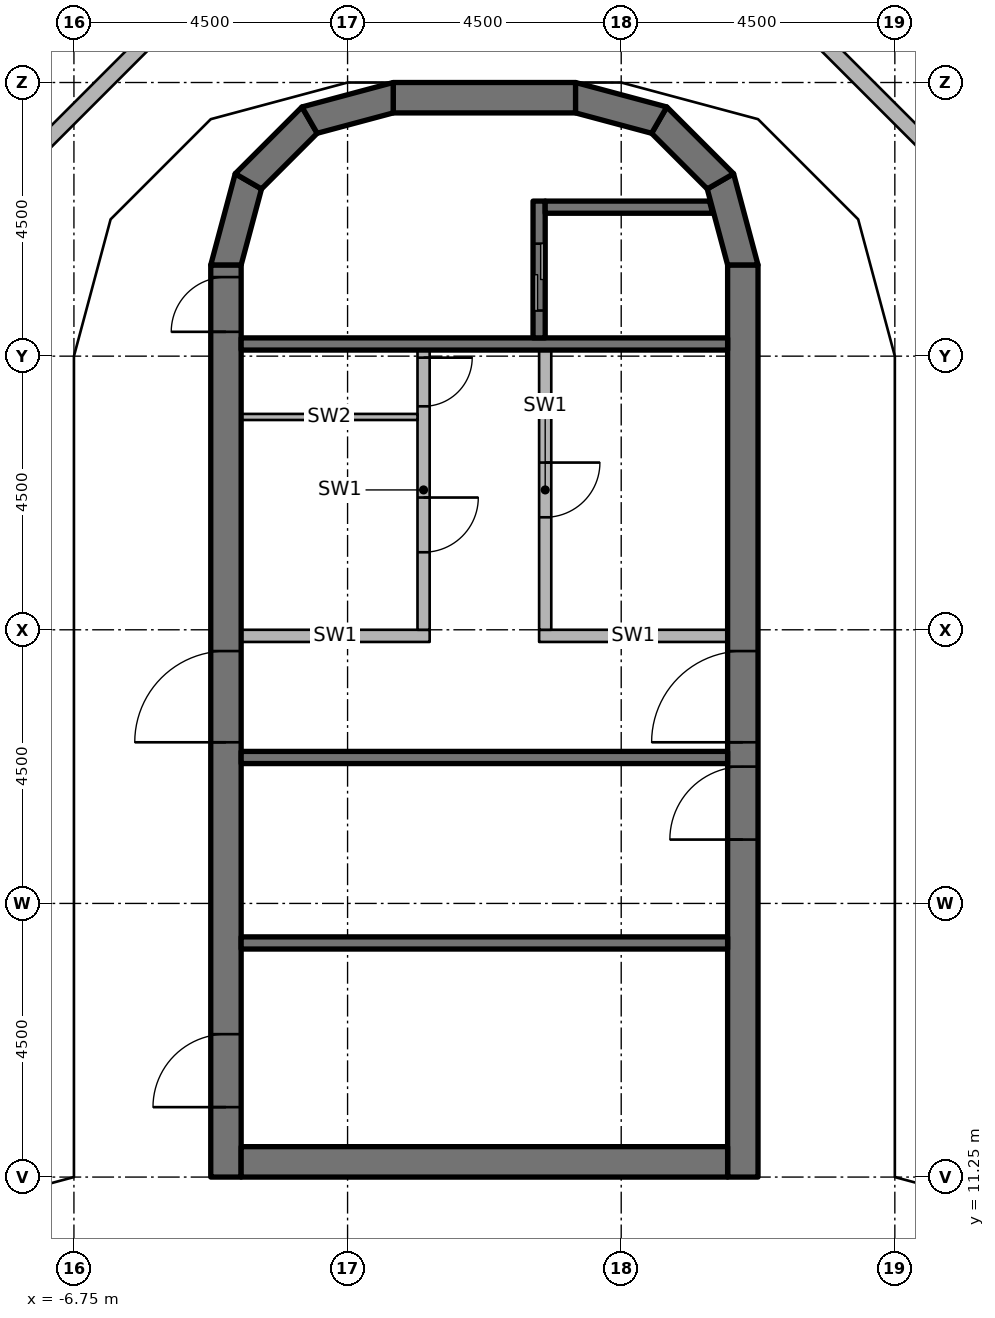
"""IFC4 building model, lengths in metres.
Left out: names, types, materials, properties, quantities, classifications, styles, units other than length and angle.
Written with IfcOpenShell. Run it as: python <this file> out.ifc"""

import sys

from ifc_helpers import new_model, si_unit, direction, frame, frame_2d, origin, origin_2d, place, context, subcontext, project, spatial, polyline, rectangle, outline, extrude, element, fill, save


model = new_model("IFC4")
c1 = context("Model", 3, precision=1e-05, world=origin(), true_north=direction((0.0, 1.0)))
c2 = subcontext(c1, "Body", "Model", "MODEL_VIEW")
j1 = project(units=[si_unit("LENGTHUNIT", "METRE"), si_unit("PLANEANGLEUNIT", "RADIAN")], contexts=[c1])
p1 = place(None, origin())
s1 = spatial("IfcSite", under=j1, at=p1, CompositionType="ELEMENT")
p2 = place(p1, origin())
s2 = spatial("IfcBuilding", under=s1, at=p2, CompositionType="ELEMENT")
p3 = place(p2, frame((0.0, 0.0, 295.2)))
s3 = spatial("IfcBuildingStorey", under=s2, at=p3, CompositionType="ELEMENT", Elevation=295.2)
for number, where, z_axis, x_axis in (
    (1, (-6.25, 10.75, 0.0), (0.0, 0.0, 1.0), (1.0, 0.0, 0.0)),
    (2, (-6.25, 15.75, 0.0), (0.0, 0.0, 1.0), (1.0, 0.0, 0.0)),
    (3, (-6.25, 20.25, 0.0), (0.0, 0.0, 1.0), (1.0, 0.0, 0.0)),
    (4, (-6.25, 24.65, 0.0), (0.0, 0.0, 1.0), (1.0, 0.0, 0.0)),
    (5, (6.25, 10.75, 0.0), (0.0, 0.0, 1.0), (1.0, 0.0, 0.0)),
    (6, (6.25, 15.75, 0.0), (0.0, 0.0, 1.0), (1.0, 0.0, 0.0)),
    (7, (6.25, 20.25, 0.0), (0.0, 0.0, 1.0), (1.0, 0.0, 0.0)),
    (8, (6.25, 24.65, 0.0), (0.0, 0.0, 1.0), (1.0, 0.0, 0.0)),
):
    element("IfcColumn", number, at=place(p3, frame(where, z_axis=z_axis, x_axis=x_axis)), inside=s3, PredefinedType="COLUMN", context=c2, shape_type="SweptSolid", body=[
        extrude(rectangle(XDim=0.6, YDim=0.6, at=origin_2d()), origin(), (0.0, 0.0, 1.0), 3.45),
    ])
p4 = place(p3, frame((-4.25, 11.25, 0.0), z_axis=(0.0, 0.0, 1.0), x_axis=(0.0, 1.0, 0.0)))
e9 = element("IfcWall", 9, at=p4, inside=s3, PredefinedType="SHEAR", context=c2, shape_type="SweptSolid", body=[
    extrude(rectangle(XDim=15.0, YDim=0.5, at=frame_2d((7.5, 0.0))), origin(), (0.0, 0.0, 1.0), 3.6),
])
p5 = place(p4, frame((7.15, 0.0, 0.0)))
e10 = element("IfcOpeningElement", 10, at=p5, cuts=e9, PredefinedType="OPENING", context=c2, shape_type="SweptSolid", body=[
    extrude(rectangle(XDim=1.5, YDim=2.3, at=frame_2d((0.75, 1.15))), frame((0.0, 0.26, 0.0), z_axis=(0.0, -1.0, 0.0), x_axis=(1.0, 0.0, 0.0)), (0.0, 0.0, 1.0), 0.52),
])
p6 = place(p4, frame((13.9, 0.0, 0.0)))
e11 = element("IfcOpeningElement", 11, at=p6, cuts=e9, PredefinedType="OPENING", context=c2, shape_type="SweptSolid", body=[
    extrude(rectangle(XDim=0.9, YDim=2.1, at=frame_2d((0.45, 1.05))), frame((0.0, 0.26, 0.0), z_axis=(0.0, -1.0, 0.0), x_axis=(1.0, 0.0, 0.0)), (0.0, 0.0, 1.0), 0.52),
])
p7 = place(p4, frame((1.15, 0.0, 0.0)))
e12 = element("IfcOpeningElement", 12, at=p7, cuts=e9, PredefinedType="OPENING", context=c2, shape_type="SweptSolid", body=[
    extrude(rectangle(XDim=1.2, YDim=2.1, at=frame_2d((0.6, 1.05))), frame((0.0, 0.26, 0.0), z_axis=(0.0, -1.0, 0.0), x_axis=(1.0, 0.0, 0.0)), (0.0, 0.0, 1.0), 0.52),
])
p8 = place(p3, frame((4.25, 11.25, 0.0), z_axis=(0.0, 0.0, 1.0), x_axis=(0.0, 1.0, 0.0)))
e13 = element("IfcWall", 13, at=p8, inside=s3, PredefinedType="SHEAR", context=c2, shape_type="SweptSolid", body=[
    extrude(rectangle(XDim=15.0, YDim=0.5, at=frame_2d((7.5, 0.0))), origin(), (0.0, 0.0, 1.0), 3.6),
])
p9 = place(p8, frame((7.15, 0.0, 0.0)))
e14 = element("IfcOpeningElement", 14, at=p9, cuts=e13, PredefinedType="OPENING", context=c2, shape_type="SweptSolid", body=[
    extrude(rectangle(XDim=1.5, YDim=2.3, at=frame_2d((0.75, 1.15))), frame((0.0, 0.26, 0.0), z_axis=(0.0, -1.0, 0.0), x_axis=(1.0, 0.0, 0.0)), (0.0, 0.0, 1.0), 0.52),
])
p10 = place(p8, frame((5.55, 0.0, 0.0)))
e15 = element("IfcOpeningElement", 15, at=p10, cuts=e13, PredefinedType="OPENING", context=c2, shape_type="SweptSolid", body=[
    extrude(rectangle(XDim=1.2, YDim=2.1, at=frame_2d((0.6, 1.05))), frame((0.0, 0.26, 0.0), z_axis=(0.0, -1.0, 0.0), x_axis=(1.0, 0.0, 0.0)), (0.0, 0.0, 1.0), 0.52),
])
p11 = place(p3, frame((-4.0, 11.5, 0.0), z_axis=(0.0, 0.0, 1.0), x_axis=(1.0, 0.0, 0.0)))
e16 = element("IfcWall", 16, at=p11, inside=s3, PredefinedType="SHEAR", context=c2, shape_type="SweptSolid", body=[
    extrude(rectangle(XDim=8.0, YDim=0.5, at=frame_2d((4.0, 0.0))), origin(), (0.0, 0.0, 1.0), 3.6),
])
p12 = place(p3, frame((-1.5, 29.0, 0.0), z_axis=(0.0, 0.0, 1.0), x_axis=(1.0, 0.0, 0.0)))
e17 = element("IfcWall", 17, at=p12, inside=s3, PredefinedType="SHEAR", context=c2, shape_type="SweptSolid", body=[
    extrude(rectangle(XDim=3.0, YDim=0.5, at=frame_2d((1.5, 0.0))), origin(), (0.0, 0.0, 1.0), 3.6),
])
p13 = place(p3, origin())
e18 = element("IfcWall", 18, at=p13, inside=s3, PredefinedType="SHEAR", context=c2, shape_type="SweptSolid", body=[
    extrude(outline(polyline([(-4.5, 26.25), (-4.098, 27.75), (-3.665, 27.5), (-4.0, 26.25), (-4.5, 26.25)])), origin(), (0.0, 0.0, 1.0), 3.6),
])
p14 = place(p3, origin())
e19 = element("IfcWall", 19, at=p14, inside=s3, PredefinedType="SHEAR", context=c2, shape_type="SweptSolid", body=[
    extrude(outline(polyline([(-4.098, 27.75), (-3.0, 28.848), (-2.75, 28.415), (-3.665, 27.5), (-4.098, 27.75)])), origin(), (0.0, 0.0, 1.0), 3.6),
])
p15 = place(p3, origin())
e20 = element("IfcWall", 20, at=p15, inside=s3, PredefinedType="SHEAR", context=c2, shape_type="SweptSolid", body=[
    extrude(outline(polyline([(-3.0, 28.848), (-1.5, 29.25), (-1.5, 28.75), (-2.75, 28.415), (-3.0, 28.848)])), origin(), (0.0, 0.0, 1.0), 3.6),
])
p16 = place(p3, origin())
e21 = element("IfcWall", 21, at=p16, inside=s3, PredefinedType="SHEAR", context=c2, shape_type="SweptSolid", body=[
    extrude(outline(polyline([(4.5, 26.25), (4.098, 27.75), (3.665, 27.5), (4.0, 26.25), (4.5, 26.25)])), origin(), (0.0, 0.0, 1.0), 3.6),
])
p17 = place(p3, origin())
e22 = element("IfcWall", 22, at=p17, inside=s3, PredefinedType="SHEAR", context=c2, shape_type="SweptSolid", body=[
    extrude(outline(polyline([(4.098, 27.75), (3.0, 28.848), (2.75, 28.415), (3.665, 27.5), (4.098, 27.75)])), origin(), (0.0, 0.0, 1.0), 3.6),
])
p18 = place(p3, origin())
e23 = element("IfcWall", 23, at=p18, inside=s3, PredefinedType="SHEAR", context=c2, shape_type="SweptSolid", body=[
    extrude(outline(polyline([(3.0, 28.848), (1.5, 29.25), (1.5, 28.75), (2.75, 28.415), (3.0, 28.848)])), origin(), (0.0, 0.0, 1.0), 3.6),
])
p19 = place(p3, origin())
e24 = element("IfcWall", 24, at=p19, inside=s3, PredefinedType="PARAPET", context=c2, shape_type="SweptSolid", body=[
    extrude(outline(polyline([(-7.743, 27.921), (-5.421, 30.243), (-5.292, 30.019), (-7.519, 27.792), (-7.743, 27.921)])), origin(), (0.0, 0.0, 1.0), 1.22),
])
p20 = place(p3, origin())
e25 = element("IfcWall", 25, at=p20, inside=s3, PredefinedType="PARAPET", context=c2, shape_type="SweptSolid", body=[
    extrude(outline(polyline([(5.421, 30.243), (7.743, 27.921), (7.519, 27.792), (5.292, 30.019), (5.421, 30.243)])), origin(), (0.0, 0.0, 1.0), 1.22),
])
p21 = place(p3, frame((-4.0, 24.95, 0.0), z_axis=(0.0, 0.0, 1.0), x_axis=(1.0, 0.0, 0.0)))
e26 = element("IfcWall", 26, at=p21, inside=s3, PredefinedType="SHEAR", context=c2, shape_type="SweptSolid", body=[
    extrude(rectangle(XDim=8.0, YDim=0.2, at=frame_2d((4.0, 0.0))), origin(), (0.0, 0.0, 1.0), 3.45),
])
p22 = place(p3, frame((0.9, 27.3, 0.0), z_axis=(0.0, 0.0, 1.0), x_axis=(0.0, -1.0, 0.0)))
e27 = element("IfcWall", 27, at=p22, inside=s3, PredefinedType="SHEAR", context=c2, shape_type="SweptSolid", body=[
    extrude(rectangle(XDim=2.25, YDim=0.2, at=frame_2d((1.125, 0.0))), origin(), (0.0, 0.0, 1.0), 3.45),
])
p23 = place(p22, frame((0.7, 0.0, 0.0)))
e28 = element("IfcOpeningElement", 28, at=p23, cuts=e27, PredefinedType="OPENING", context=c2, shape_type="SweptSolid", body=[
    extrude(rectangle(XDim=1.1, YDim=2.3, at=frame_2d((0.55, 1.15))), frame((0.0, 0.11, 0.0), z_axis=(0.0, -1.0, 0.0), x_axis=(1.0, 0.0, 0.0)), (0.0, 0.0, 1.0), 0.22),
])
p24 = place(p3, origin())
e29 = element("IfcWall", 29, at=p24, inside=s3, PredefinedType="SHEAR", context=c2, shape_type="SweptSolid", body=[
    extrude(outline(polyline([(1.0, 27.1), (3.755, 27.1), (3.701, 27.3), (1.0, 27.3), (1.0, 27.1)])), origin(), (0.0, 0.0, 1.0), 3.45),
])
for number, where, z_axis, x_axis in (
    (30, (-4.0, 18.15, 0.0), (0.0, 0.0, 1.0), (1.0, 0.0, 0.0)),
    (31, (-4.0, 15.1, 0.0), (0.0, 0.0, 1.0), (1.0, 0.0, 0.0)),
):
    element("IfcWall", number, at=place(p3, frame(where, z_axis=z_axis, x_axis=x_axis)), inside=s3, PredefinedType="SHEAR", context=c2, shape_type="SweptSolid", body=[
        extrude(rectangle(XDim=8.0, YDim=0.2, at=frame_2d((4.0, 0.0))), origin(), (0.0, 0.0, 1.0), 3.45),
    ])
p25 = place(p3, frame((-4.0, 20.15, 0.0), z_axis=(0.0, 0.0, 1.0), x_axis=(1.0, 0.0, 0.0)))
e32 = element("IfcWall", 32, at=p25, inside=s3, PredefinedType="PARTITIONING", context=c2, shape_type="SweptSolid", body=[
    extrude(rectangle(XDim=3.1, YDim=0.2, at=frame_2d((1.55, 0.0))), origin(), (0.0, 0.0, 1.0), 3.45),
])
p26 = place(p3, frame((-1.0, 24.85, 0.0), z_axis=(0.0, 0.0, 1.0), x_axis=(0.0, -1.0, 0.0)))
e33 = element("IfcWall", 33, at=p26, inside=s3, PredefinedType="PARTITIONING", context=c2, shape_type="SweptSolid", body=[
    extrude(rectangle(XDim=4.6, YDim=0.2, at=frame_2d((2.3, 0.0))), origin(), (0.0, 0.0, 1.0), 3.45),
])
p27 = place(p26, frame((0.125, 0.0, 0.0)))
e34 = element("IfcOpeningElement", 34, at=p27, cuts=e33, PredefinedType="OPENING", context=c2, shape_type="SweptSolid", body=[
    extrude(rectangle(XDim=0.8, YDim=2.1, at=frame_2d((0.4, 1.05))), frame((0.0, 0.11, 0.0), z_axis=(0.0, -1.0, 0.0), x_axis=(1.0, 0.0, 0.0)), (0.0, 0.0, 1.0), 0.22),
])
p28 = place(p26, frame((2.425, 0.0, 0.0)))
e35 = element("IfcOpeningElement", 35, at=p28, cuts=e33, PredefinedType="OPENING", context=c2, shape_type="SweptSolid", body=[
    extrude(rectangle(XDim=0.9, YDim=2.1, at=frame_2d((0.45, 1.05))), frame((0.0, 0.11, 0.0), z_axis=(0.0, -1.0, 0.0), x_axis=(1.0, 0.0, 0.0)), (0.0, 0.0, 1.0), 0.22),
])
p29 = place(p3, frame((0.9, 20.15, 0.0), z_axis=(0.0, 0.0, 1.0), x_axis=(1.0, 0.0, 0.0)))
e36 = element("IfcWall", 36, at=p29, inside=s3, PredefinedType="PARTITIONING", context=c2, shape_type="SweptSolid", body=[
    extrude(rectangle(XDim=3.1, YDim=0.2, at=frame_2d((1.55, 0.0))), origin(), (0.0, 0.0, 1.0), 3.45),
])
p30 = place(p3, frame((1.0, 24.85, 0.0), z_axis=(0.0, 0.0, 1.0), x_axis=(0.0, -1.0, 0.0)))
e37 = element("IfcWall", 37, at=p30, inside=s3, PredefinedType="PARTITIONING", context=c2, shape_type="SweptSolid", body=[
    extrude(rectangle(XDim=4.6, YDim=0.2, at=frame_2d((2.3, 0.0))), origin(), (0.0, 0.0, 1.0), 3.45),
])
p31 = place(p30, frame((1.85, 0.0, 0.0)))
e38 = element("IfcOpeningElement", 38, at=p31, cuts=e37, PredefinedType="OPENING", context=c2, shape_type="SweptSolid", body=[
    extrude(rectangle(XDim=0.9, YDim=2.1, at=frame_2d((0.45, 1.05))), frame((0.0, 0.11, 0.0), z_axis=(0.0, -1.0, 0.0), x_axis=(1.0, 0.0, 0.0)), (0.0, 0.0, 1.0), 0.22),
])
p32 = place(p3, frame((-4.0, 23.75, 0.0), z_axis=(0.0, 0.0, 1.0), x_axis=(1.0, 0.0, 0.0)))
e39 = element("IfcWall", 39, at=p32, inside=s3, PredefinedType="PARTITIONING", context=c2, shape_type="SweptSolid", body=[
    extrude(rectangle(XDim=2.9, YDim=0.1, at=frame_2d((1.45, 0.0))), origin(), (0.0, 0.0, 1.0), 3.45),
])
p33 = place(p5, origin())
e40 = element("IfcDoor", 40, at=p33, inside=s3, OperationType="DOUBLE_DOOR_SINGLE_SWING", PredefinedType="DOOR", context=c2, shape_type="SweptSolid", body=[
    extrude(rectangle(XDim=1.5, YDim=2.3, at=frame_2d((0.75, 1.15))), frame((0.0, 0.025, 0.0), z_axis=(0.0, -1.0, 0.0), x_axis=(1.0, 0.0, 0.0)), (0.0, 0.0, 1.0), 0.05),
])
fill(e10, e40)
p34 = place(p9, origin())
e41 = element("IfcDoor", 41, at=p34, inside=s3, OperationType="DOUBLE_DOOR_SINGLE_SWING", PredefinedType="DOOR", context=c2, shape_type="SweptSolid", body=[
    extrude(rectangle(XDim=1.5, YDim=2.3, at=frame_2d((0.75, 1.15))), frame((0.0, 0.025, 0.0), z_axis=(0.0, -1.0, 0.0), x_axis=(1.0, 0.0, 0.0)), (0.0, 0.0, 1.0), 0.05),
])
fill(e14, e41)
p35 = place(p6, origin())
e42 = element("IfcDoor", 42, at=p35, inside=s3, OperationType="SINGLE_SWING_RIGHT", PredefinedType="DOOR", context=c2, shape_type="SweptSolid", body=[
    extrude(rectangle(XDim=0.9, YDim=2.1, at=frame_2d((0.45, 1.05))), frame((0.0, 0.025, 0.0), z_axis=(0.0, -1.0, 0.0), x_axis=(1.0, 0.0, 0.0)), (0.0, 0.0, 1.0), 0.05),
])
fill(e11, e42)
p36 = place(p10, origin())
e43 = element("IfcDoor", 43, at=p36, inside=s3, OperationType="SINGLE_SWING_RIGHT", PredefinedType="DOOR", context=c2, shape_type="SweptSolid", body=[
    extrude(rectangle(XDim=1.2, YDim=2.1, at=frame_2d((0.6, 1.05))), frame((0.0, 0.025, 0.0), z_axis=(0.0, -1.0, 0.0), x_axis=(1.0, 0.0, 0.0)), (0.0, 0.0, 1.0), 0.05),
])
fill(e15, e43)
p37 = place(p7, origin())
e44 = element("IfcDoor", 44, at=p37, inside=s3, OperationType="SINGLE_SWING_LEFT", PredefinedType="DOOR", context=c2, shape_type="SweptSolid", body=[
    extrude(rectangle(XDim=1.2, YDim=2.1, at=frame_2d((0.6, 1.05))), frame((0.0, 0.025, 0.0), z_axis=(0.0, -1.0, 0.0), x_axis=(1.0, 0.0, 0.0)), (0.0, 0.0, 1.0), 0.05),
])
fill(e12, e44)
p38 = place(p23, origin())
e45 = element("IfcDoor", 45, at=p38, inside=s3, OperationType="DOUBLE_DOOR_SLIDING", PredefinedType="DOOR", context=c2, shape_type="SweptSolid", body=[
    extrude(rectangle(XDim=1.1, YDim=2.3, at=frame_2d((0.55, 1.15))), frame((0.0, 0.025, 0.0), z_axis=(0.0, -1.0, 0.0), x_axis=(1.0, 0.0, 0.0)), (0.0, 0.0, 1.0), 0.05),
])
fill(e28, e45)
p39 = place(p27, origin())
e46 = element("IfcDoor", 46, at=p39, inside=s3, OperationType="SINGLE_SWING_RIGHT", PredefinedType="DOOR", context=c2, shape_type="SweptSolid", body=[
    extrude(rectangle(XDim=0.8, YDim=2.1, at=frame_2d((0.4, 1.05))), frame((0.0, 0.025, 0.0), z_axis=(0.0, -1.0, 0.0), x_axis=(1.0, 0.0, 0.0)), (0.0, 0.0, 1.0), 0.05),
])
fill(e34, e46)
p40 = place(p28, origin())
e47 = element("IfcDoor", 47, at=p40, inside=s3, OperationType="SINGLE_SWING_RIGHT", PredefinedType="DOOR", context=c2, shape_type="SweptSolid", body=[
    extrude(rectangle(XDim=0.9, YDim=2.1, at=frame_2d((0.45, 1.05))), frame((0.0, 0.025, 0.0), z_axis=(0.0, -1.0, 0.0), x_axis=(1.0, 0.0, 0.0)), (0.0, 0.0, 1.0), 0.05),
])
fill(e35, e47)
p41 = place(p31, origin())
e48 = element("IfcDoor", 48, at=p41, inside=s3, OperationType="SINGLE_SWING_LEFT", PredefinedType="DOOR", context=c2, shape_type="SweptSolid", body=[
    extrude(rectangle(XDim=0.9, YDim=2.1, at=frame_2d((0.45, 1.05))), frame((0.0, 0.025, 0.0), z_axis=(0.0, -1.0, 0.0), x_axis=(1.0, 0.0, 0.0)), (0.0, 0.0, 1.0), 0.05),
])
fill(e38, e48)
save(model, sys.argv[1])
